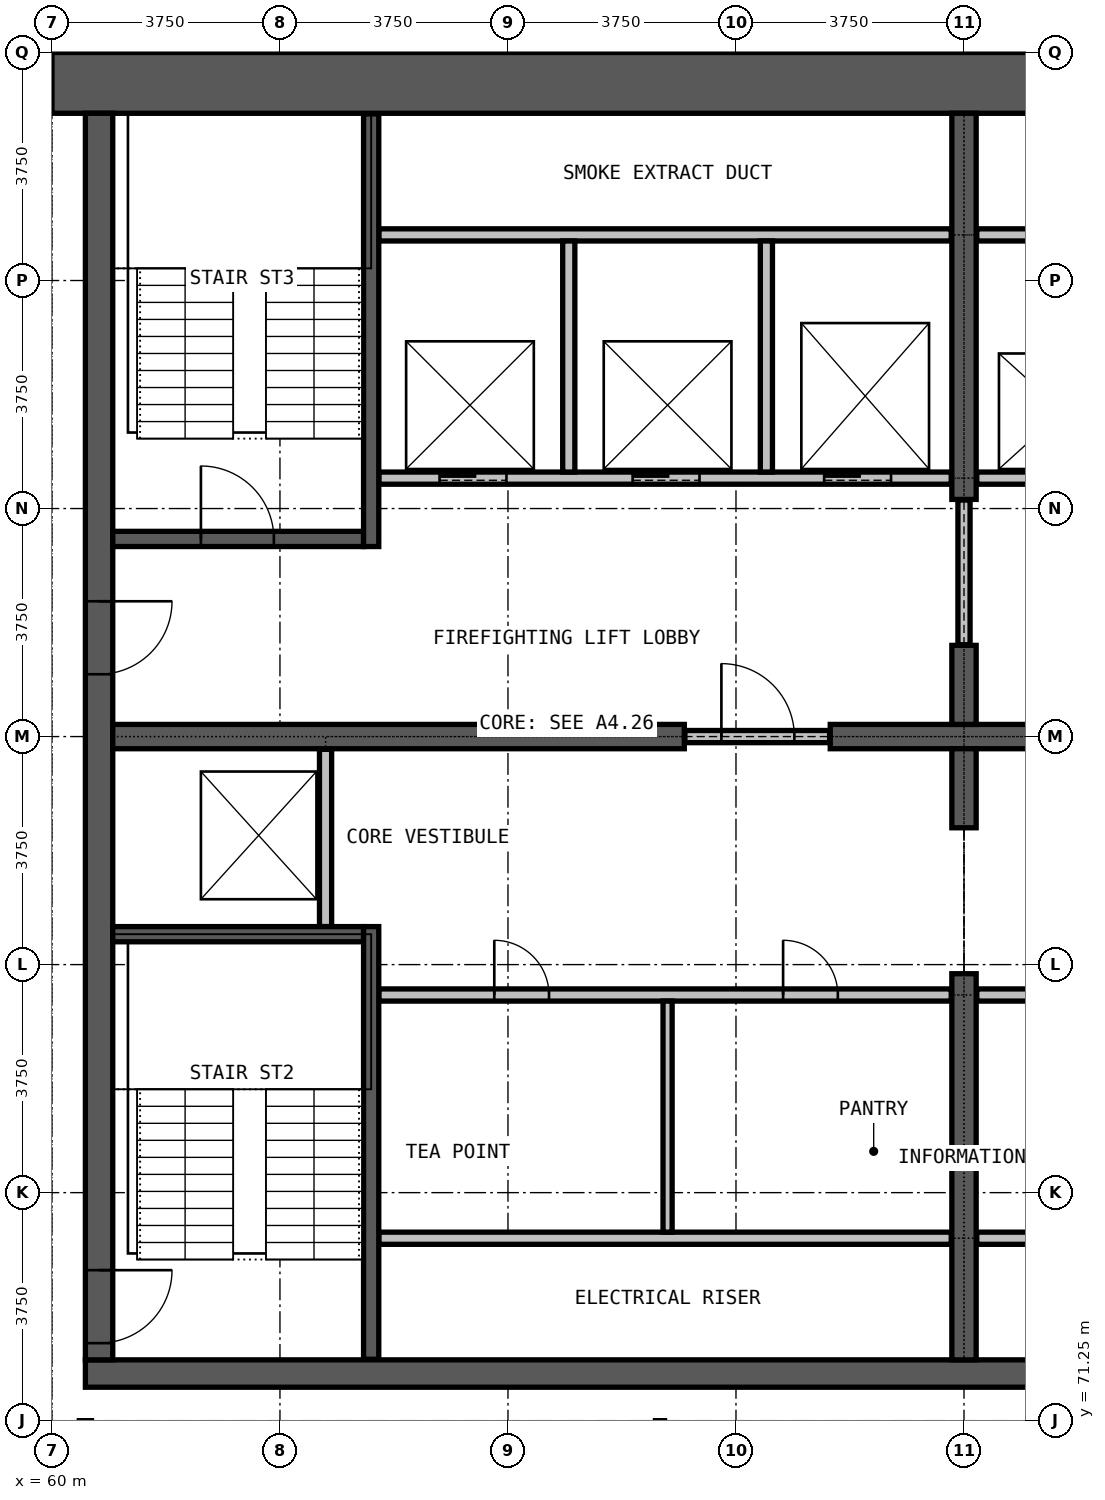
"""IFC4 building model, lengths in metres.
Left out: names, types, materials, properties, quantities, classifications, styles, units other than length and angle.
Written with IfcOpenShell. Run it as: python <this file> out.ifc"""

import sys

from ifc_helpers import new_model, si_unit, direction, frame, frame_2d, origin, place, context, subcontext, project, spatial, rectangle, extrude, element, fill, save


model = new_model("IFC4")
c1 = context("Model", 3, precision=1e-05, world=origin(), true_north=direction((0.0, 1.0)))
c2 = subcontext(c1, "Body", "Model", "MODEL_VIEW")
j1 = project(units=[si_unit("LENGTHUNIT", "METRE"), si_unit("PLANEANGLEUNIT", "RADIAN")], contexts=[c1])
p1 = place(None, origin())
s1 = spatial("IfcSite", under=j1, at=p1, CompositionType="ELEMENT")
p2 = place(p1, origin())
s2 = spatial("IfcBuilding", under=s1, at=p2, CompositionType="ELEMENT")
p3 = place(p2, frame((0.0, 0.0, 262.1)))
s3 = spatial("IfcBuildingStorey", under=s2, at=p3, CompositionType="ELEMENT", Elevation=262.1)
p4 = place(p3, frame((60.55, 72.025, 0.0), z_axis=(0.0, 0.0, 1.0), x_axis=(1.0, 0.0, 0.0)))
e1 = element("IfcWall", 1, at=p4, inside=s3, PredefinedType="SHEAR", context=c2, shape_type="SweptSolid", body=[
    extrude(rectangle(XDim=28.9, YDim=0.45, at=frame_2d((14.45, 0.0))), origin(), (0.0, 0.0, 1.0), 3.6),
])
p5 = place(p3, frame((90.0, 93.25, 0.0), z_axis=(0.0, 0.0, 1.0), x_axis=(-1.0, 0.0, 0.0)))
e2 = element("IfcWall", 2, at=p5, inside=s3, PredefinedType="SHEAR", context=c2, shape_type="SweptSolid", body=[
    extrude(rectangle(XDim=30.0, YDim=1.0, at=frame_2d((15.0, 0.0))), origin(), (0.0, 0.0, 1.0), 3.6),
])
p6 = place(p3, frame((60.775, 92.75, 0.0), z_axis=(0.0, 0.0, 1.0), x_axis=(0.0, -1.0, 0.0)))
e3 = element("IfcWall", 3, at=p6, inside=s3, PredefinedType="SHEAR", context=c2, shape_type="SweptSolid", body=[
    extrude(rectangle(XDim=20.5, YDim=0.45, at=frame_2d((10.25, 0.0))), origin(), (0.0, 0.0, 1.0), 3.6),
])
p7 = place(p6, frame((19.025, 0.0, 0.0)))
e4 = element("IfcOpeningElement", 4, at=p7, cuts=e3, PredefinedType="OPENING", context=c2, shape_type="SweptSolid", body=[
    extrude(rectangle(XDim=1.2, YDim=2.2, at=frame_2d((0.6, 1.1))), frame((0.0, 0.235, 0.0), z_axis=(0.0, -1.0, 0.0), x_axis=(1.0, 0.0, 0.0)), (0.0, 0.0, 1.0), 0.47),
])
p8 = place(p6, frame((8.025, 0.0, 0.0)))
e5 = element("IfcOpeningElement", 5, at=p8, cuts=e3, PredefinedType="OPENING", context=c2, shape_type="SweptSolid", body=[
    extrude(rectangle(XDim=1.2, YDim=2.2, at=frame_2d((0.6, 1.1))), frame((0.0, 0.235, 0.0), z_axis=(0.0, -1.0, 0.0), x_axis=(1.0, 0.0, 0.0)), (0.0, 0.0, 1.0), 0.47),
])
p9 = place(p3, frame((61.0, 82.5, 0.0), z_axis=(0.0, 0.0, 1.0), x_axis=(1.0, 0.0, 0.0)))
e6 = element("IfcWall", 6, at=p9, inside=s3, PredefinedType="SHEAR", context=c2, shape_type="SweptSolid", body=[
    extrude(rectangle(XDim=9.4, YDim=0.4, at=frame_2d((4.7, 0.0))), origin(), (0.0, 0.0, 1.0), 3.6),
])
p10 = place(p3, frame((72.8, 82.5, 0.0), z_axis=(0.0, 0.0, 1.0), x_axis=(1.0, 0.0, 0.0)))
e7 = element("IfcWall", 7, at=p10, inside=s3, PredefinedType="SHEAR", context=c2, shape_type="SweptSolid", body=[
    extrude(rectangle(XDim=4.4, YDim=0.4, at=frame_2d((2.2, 0.0))), origin(), (0.0, 0.0, 1.0), 3.6),
])
p11 = place(p3, frame((75.0, 72.25, 0.0), z_axis=(0.0, 0.0, 1.0), x_axis=(0.0, 1.0, 0.0)))
e8 = element("IfcWall", 8, at=p11, inside=s3, PredefinedType="SHEAR", context=c2, shape_type="SweptSolid", body=[
    extrude(rectangle(XDim=6.35, YDim=0.4, at=frame_2d((3.175, 0.0))), origin(), (0.0, 0.0, 1.0), 3.6),
])
for number, where, z_axis, x_axis in (
    (9, (75.0, 81.0, 0.0), (0.0, 0.0, 1.0), (0.0, 1.0, 0.0)),
    (10, (75.0, 82.7, 0.0), (0.0, 0.0, 1.0), (0.0, 1.0, 0.0)),
):
    element("IfcWall", number, at=place(p3, frame(where, z_axis=z_axis, x_axis=x_axis)), inside=s3, PredefinedType="SHEAR", context=c2, shape_type="SweptSolid", body=[
        extrude(rectangle(XDim=1.3, YDim=0.4, at=frame_2d((0.65, 0.0))), origin(), (0.0, 0.0, 1.0), 3.6),
    ])
p12 = place(p3, frame((75.0, 86.4, 0.0), z_axis=(0.0, 0.0, 1.0), x_axis=(0.0, 1.0, 0.0)))
e11 = element("IfcWall", 11, at=p12, inside=s3, PredefinedType="SHEAR", context=c2, shape_type="SweptSolid", body=[
    extrude(rectangle(XDim=6.35, YDim=0.4, at=frame_2d((3.175, 0.0))), origin(), (0.0, 0.0, 1.0), 3.6),
])
for number, where, z_axis, x_axis in (
    (12, (65.375, 74.25, 0.0), (0.0, 0.0, 1.0), (1.0, 0.0, 0.0)),
    (13, (75.21, 74.25, 0.0), (0.0, 0.0, 1.0), (1.0, 0.0, 0.0)),
):
    element("IfcWall", number, at=place(p3, frame(where, z_axis=z_axis, x_axis=x_axis)), inside=s3, PredefinedType="PARTITIONING", context=c2, shape_type="SweptSolid", body=[
        extrude(rectangle(XDim=9.415, YDim=0.2, at=frame_2d((4.708, 0.0))), origin(), (0.0, 0.0, 1.0), 3.3),
    ])
p13 = place(p3, frame((65.375, 78.25, 0.0), z_axis=(0.0, 0.0, 1.0), x_axis=(1.0, 0.0, 0.0)))
e14 = element("IfcWall", 14, at=p13, inside=s3, PredefinedType="PARTITIONING", context=c2, shape_type="SweptSolid", body=[
    extrude(rectangle(XDim=9.415, YDim=0.2, at=frame_2d((4.708, 0.0))), origin(), (0.0, 0.0, 1.0), 3.3),
])
p14 = place(p13, frame((1.9, 0.0, 0.0)))
e15 = element("IfcOpeningElement", 15, at=p14, cuts=e14, PredefinedType="OPENING", context=c2, shape_type="SweptSolid", body=[
    extrude(rectangle(XDim=0.9, YDim=2.2, at=frame_2d((0.45, 1.1))), frame((0.0, 0.11, 0.0), z_axis=(0.0, -1.0, 0.0), x_axis=(1.0, 0.0, 0.0)), (0.0, 0.0, 1.0), 0.22),
])
p15 = place(p13, frame((6.65, 0.0, 0.0)))
e16 = element("IfcOpeningElement", 16, at=p15, cuts=e14, PredefinedType="OPENING", context=c2, shape_type="SweptSolid", body=[
    extrude(rectangle(XDim=0.9, YDim=2.2, at=frame_2d((0.45, 1.1))), frame((0.0, 0.11, 0.0), z_axis=(0.0, -1.0, 0.0), x_axis=(1.0, 0.0, 0.0)), (0.0, 0.0, 1.0), 0.22),
])
p16 = place(p3, frame((75.21, 78.25, 0.0), z_axis=(0.0, 0.0, 1.0), x_axis=(1.0, 0.0, 0.0)))
e17 = element("IfcWall", 17, at=p16, inside=s3, PredefinedType="PARTITIONING", context=c2, shape_type="SweptSolid", body=[
    extrude(rectangle(XDim=9.415, YDim=0.2, at=frame_2d((4.708, 0.0))), origin(), (0.0, 0.0, 1.0), 3.3),
])
p17 = place(p16, frame((0.95, 0.0, 0.0)))
e18 = element("IfcOpeningElement", 18, at=p17, cuts=e17, PredefinedType="OPENING", context=c2, shape_type="SweptSolid", body=[
    extrude(rectangle(XDim=0.9, YDim=2.2, at=frame_2d((0.45, 1.1))), frame((0.0, 0.11, 0.0), z_axis=(0.0, -1.0, 0.0), x_axis=(1.0, 0.0, 0.0)), (0.0, 0.0, 1.0), 0.22),
])
p18 = place(p16, frame((5.63, 0.0, 0.0)))
e19 = element("IfcOpeningElement", 19, at=p18, cuts=e17, PredefinedType="OPENING", context=c2, shape_type="SweptSolid", body=[
    extrude(rectangle(XDim=0.9, YDim=2.2, at=frame_2d((0.45, 1.1))), frame((0.0, 0.11, 0.0), z_axis=(0.0, -1.0, 0.0), x_axis=(1.0, 0.0, 0.0)), (0.0, 0.0, 1.0), 0.22),
])
p19 = place(p3, frame((70.41, 82.5, 0.0), z_axis=(0.0, 0.0, 1.0), x_axis=(1.0, 0.0, 0.0)))
e20 = element("IfcWall", 20, at=p19, inside=s3, PredefinedType="PARTITIONING", context=c2, shape_type="SweptSolid", body=[
    extrude(rectangle(XDim=2.38, YDim=0.2, at=frame_2d((1.19, 0.0))), origin(), (0.0, 0.0, 1.0), 2.4),
])
p20 = place(p19, frame((0.6, 0.0, 0.0)))
e21 = element("IfcOpeningElement", 21, at=p20, cuts=e20, PredefinedType="OPENING", context=c2, shape_type="SweptSolid", body=[
    extrude(rectangle(XDim=1.2, YDim=2.2, at=frame_2d((0.6, 1.1))), frame((0.0, 0.11, 0.0), z_axis=(0.0, -1.0, 0.0), x_axis=(1.0, 0.0, 0.0)), (0.0, 0.0, 1.0), 0.22),
])
p21 = place(p3, frame((75.0, 84.01, 0.0), z_axis=(0.0, 0.0, 1.0), x_axis=(0.0, 1.0, 0.0)))
e22 = element("IfcWall", 22, at=p21, inside=s3, PredefinedType="PARTITIONING", context=c2, shape_type="SweptSolid", body=[
    extrude(rectangle(XDim=2.38, YDim=0.2, at=frame_2d((1.19, 0.0))), origin(), (0.0, 0.0, 1.0), 2.4),
])
p22 = place(p3, frame((70.125, 74.35, 0.0), z_axis=(0.0, 0.0, 1.0), x_axis=(0.0, 1.0, 0.0)))
e23 = element("IfcWall", 23, at=p22, inside=s3, PredefinedType="PARTITIONING", context=c2, shape_type="SweptSolid", body=[
    extrude(rectangle(XDim=3.8, YDim=0.15, at=frame_2d((1.9, 0.0))), origin(), (0.0, 0.0, 1.0), 3.3),
])
p23 = place(p3, frame((65.375, 86.75, 0.0), z_axis=(0.0, 0.0, 1.0), x_axis=(1.0, 0.0, 0.0)))
e24 = element("IfcWall", 24, at=p23, inside=s3, PredefinedType="PARTITIONING", context=c2, shape_type="SweptSolid", body=[
    extrude(rectangle(XDim=9.415, YDim=0.2, at=frame_2d((4.708, 0.0))), origin(), (0.0, 0.0, 1.0), 3.3),
])
p24 = place(p23, frame((1.0, 0.0, 0.0)))
e25 = element("IfcOpeningElement", 25, at=p24, cuts=e24, PredefinedType="OPENING", context=c2, shape_type="SweptSolid", body=[
    extrude(rectangle(XDim=1.1, YDim=2.2, at=frame_2d((0.55, 1.1))), frame((0.0, 0.11, 0.0), z_axis=(0.0, -1.0, 0.0), x_axis=(1.0, 0.0, 0.0)), (0.0, 0.0, 1.0), 0.22),
])
p25 = place(p23, frame((4.175, 0.0, 0.0)))
e26 = element("IfcOpeningElement", 26, at=p25, cuts=e24, PredefinedType="OPENING", context=c2, shape_type="SweptSolid", body=[
    extrude(rectangle(XDim=1.1, YDim=2.2, at=frame_2d((0.55, 1.1))), frame((0.0, 0.11, 0.0), z_axis=(0.0, -1.0, 0.0), x_axis=(1.0, 0.0, 0.0)), (0.0, 0.0, 1.0), 0.22),
])
p26 = place(p23, frame((7.325, 0.0, 0.0)))
e27 = element("IfcOpeningElement", 27, at=p26, cuts=e24, PredefinedType="OPENING", context=c2, shape_type="SweptSolid", body=[
    extrude(rectangle(XDim=1.1, YDim=2.2, at=frame_2d((0.55, 1.1))), frame((0.0, 0.11, 0.0), z_axis=(0.0, -1.0, 0.0), x_axis=(1.0, 0.0, 0.0)), (0.0, 0.0, 1.0), 0.22),
])
p27 = place(p3, frame((75.21, 86.75, 0.0), z_axis=(0.0, 0.0, 1.0), x_axis=(1.0, 0.0, 0.0)))
e28 = element("IfcWall", 28, at=p27, inside=s3, PredefinedType="PARTITIONING", context=c2, shape_type="SweptSolid", body=[
    extrude(rectangle(XDim=9.415, YDim=0.2, at=frame_2d((4.708, 0.0))), origin(), (0.0, 0.0, 1.0), 3.3),
])
p28 = place(p27, frame((0.95, 0.0, 0.0)))
e29 = element("IfcOpeningElement", 29, at=p28, cuts=e28, PredefinedType="OPENING", context=c2, shape_type="SweptSolid", body=[
    extrude(rectangle(XDim=1.1, YDim=2.2, at=frame_2d((0.55, 1.1))), frame((0.0, 0.11, 0.0), z_axis=(0.0, -1.0, 0.0), x_axis=(1.0, 0.0, 0.0)), (0.0, 0.0, 1.0), 0.22),
])
p29 = place(p27, frame((4.14, 0.0, 0.0)))
e30 = element("IfcOpeningElement", 30, at=p29, cuts=e28, PredefinedType="OPENING", context=c2, shape_type="SweptSolid", body=[
    extrude(rectangle(XDim=1.1, YDim=2.2, at=frame_2d((0.55, 1.1))), frame((0.0, 0.11, 0.0), z_axis=(0.0, -1.0, 0.0), x_axis=(1.0, 0.0, 0.0)), (0.0, 0.0, 1.0), 0.22),
])
p30 = place(p27, frame((7.29, 0.0, 0.0)))
e31 = element("IfcOpeningElement", 31, at=p30, cuts=e28, PredefinedType="OPENING", context=c2, shape_type="SweptSolid", body=[
    extrude(rectangle(XDim=1.1, YDim=2.2, at=frame_2d((0.55, 1.1))), frame((0.0, 0.11, 0.0), z_axis=(0.0, -1.0, 0.0), x_axis=(1.0, 0.0, 0.0)), (0.0, 0.0, 1.0), 0.22),
])
for number, where, z_axis, x_axis in (
    (32, (65.375, 90.75, 0.0), (0.0, 0.0, 1.0), (1.0, 0.0, 0.0)),
    (33, (75.21, 90.75, 0.0), (0.0, 0.0, 1.0), (1.0, 0.0, 0.0)),
):
    element("IfcWall", number, at=place(p3, frame(where, z_axis=z_axis, x_axis=x_axis)), inside=s3, PredefinedType="PARTITIONING", context=c2, shape_type="SweptSolid", body=[
        extrude(rectangle(XDim=9.415, YDim=0.2, at=frame_2d((4.708, 0.0))), origin(), (0.0, 0.0, 1.0), 3.3),
    ])
p31 = place(p3, frame((64.5, 79.375, 0.0), z_axis=(0.0, 0.0, 1.0), x_axis=(0.0, 1.0, 0.0)))
e34 = element("IfcWall", 34, at=p31, inside=s3, PredefinedType="PARTITIONING", context=c2, shape_type="SweptSolid", body=[
    extrude(rectangle(XDim=2.915, YDim=0.2, at=frame_2d((1.458, 0.0))), origin(), (0.0, 0.0, 1.0), 3.3),
])
for number, where, z_axis, x_axis in (
    (35, (68.5, 86.85, 0.0), (0.0, 0.0, 1.0), (0.0, 1.0, 0.0)),
    (36, (71.75, 86.85, 0.0), (0.0, 0.0, 1.0), (0.0, 1.0, 0.0)),
):
    element("IfcWall", number, at=place(p3, frame(where, z_axis=z_axis, x_axis=x_axis)), inside=s3, PredefinedType="PARTITIONING", context=c2, shape_type="SweptSolid", body=[
        extrude(rectangle(XDim=3.8, YDim=0.2, at=frame_2d((1.9, 0.0))), origin(), (0.0, 0.0, 1.0), 3.3),
    ])
p32 = place(p3, frame((61.0, 79.25, 0.0), z_axis=(0.0, 0.0, 1.0), x_axis=(1.0, 0.0, 0.0)))
e37 = element("IfcWall", 37, at=p32, inside=s3, PredefinedType="PARTITIONING", context=c2, shape_type="SweptSolid", body=[
    extrude(rectangle(XDim=4.125, YDim=0.25, at=frame_2d((2.062, 0.0))), origin(), (0.0, 0.0, 1.0), 3.3),
])
p33 = place(p3, frame((61.0, 85.75, 0.0), z_axis=(0.0, 0.0, 1.0), x_axis=(1.0, 0.0, 0.0)))
e38 = element("IfcWall", 38, at=p33, inside=s3, PredefinedType="PARTITIONING", context=c2, shape_type="SweptSolid", body=[
    extrude(rectangle(XDim=4.125, YDim=0.25, at=frame_2d((2.062, 0.0))), origin(), (0.0, 0.0, 1.0), 3.3),
])
p34 = place(p33, frame((1.45, 0.0, 0.0)))
e39 = element("IfcOpeningElement", 39, at=p34, cuts=e38, PredefinedType="OPENING", context=c2, shape_type="SweptSolid", body=[
    extrude(rectangle(XDim=1.2, YDim=2.2, at=frame_2d((0.6, 1.1))), frame((0.0, 0.135, 0.0), z_axis=(0.0, -1.0, 0.0), x_axis=(1.0, 0.0, 0.0)), (0.0, 0.0, 1.0), 0.27),
])
for number, where, z_axis, x_axis in (
    (40, (65.25, 72.26, 0.0), (0.0, 0.0, 1.0), (0.0, 1.0, 0.0)),
    (41, (65.25, 85.625, 0.0), (0.0, 0.0, 1.0), (0.0, 1.0, 0.0)),
):
    element("IfcWall", number, at=place(p3, frame(where, z_axis=z_axis, x_axis=x_axis)), inside=s3, PredefinedType="PARTITIONING", context=c2, shape_type="SweptSolid", body=[
        extrude(rectangle(XDim=7.115, YDim=0.25, at=frame_2d((3.558, 0.0))), origin(), (0.0, 0.0, 1.0), 3.3),
    ])
p35 = place(p24, origin())
e42 = element("IfcDoor", 42, at=p35, inside=s3, OperationType="DOUBLE_DOOR_SLIDING", PredefinedType="DOOR", context=c2, shape_type="SweptSolid", body=[
    extrude(rectangle(XDim=1.1, YDim=2.2, at=frame_2d((0.55, 1.1))), frame((0.0, 0.025, 0.0), z_axis=(0.0, -1.0, 0.0), x_axis=(1.0, 0.0, 0.0)), (0.0, 0.0, 1.0), 0.05),
])
fill(e25, e42)
p36 = place(p25, origin())
e43 = element("IfcDoor", 43, at=p36, inside=s3, OperationType="DOUBLE_DOOR_SLIDING", PredefinedType="DOOR", context=c2, shape_type="SweptSolid", body=[
    extrude(rectangle(XDim=1.1, YDim=2.2, at=frame_2d((0.55, 1.1))), frame((0.0, 0.025, 0.0), z_axis=(0.0, -1.0, 0.0), x_axis=(1.0, 0.0, 0.0)), (0.0, 0.0, 1.0), 0.05),
])
fill(e26, e43)
p37 = place(p26, origin())
e44 = element("IfcDoor", 44, at=p37, inside=s3, OperationType="DOUBLE_DOOR_SLIDING", PredefinedType="DOOR", context=c2, shape_type="SweptSolid", body=[
    extrude(rectangle(XDim=1.1, YDim=2.2, at=frame_2d((0.55, 1.1))), frame((0.0, 0.025, 0.0), z_axis=(0.0, -1.0, 0.0), x_axis=(1.0, 0.0, 0.0)), (0.0, 0.0, 1.0), 0.05),
])
fill(e27, e44)
p38 = place(p20, origin())
e45 = element("IfcDoor", 45, at=p38, inside=s3, OperationType="SINGLE_SWING_LEFT", PredefinedType="DOOR", context=c2, shape_type="SweptSolid", body=[
    extrude(rectangle(XDim=1.2, YDim=2.2, at=frame_2d((0.6, 1.1))), frame((0.0, 0.025, 0.0), z_axis=(0.0, -1.0, 0.0), x_axis=(1.0, 0.0, 0.0)), (0.0, 0.0, 1.0), 0.05),
])
fill(e21, e45)
p39 = place(p34, origin())
e46 = element("IfcDoor", 46, at=p39, inside=s3, OperationType="SINGLE_SWING_LEFT", PredefinedType="DOOR", context=c2, shape_type="SweptSolid", body=[
    extrude(rectangle(XDim=1.2, YDim=2.2, at=frame_2d((0.6, 1.1))), frame((0.0, 0.025, 0.0), z_axis=(0.0, -1.0, 0.0), x_axis=(1.0, 0.0, 0.0)), (0.0, 0.0, 1.0), 0.05),
])
fill(e39, e46)
p40 = place(p7, origin())
e47 = element("IfcDoor", 47, at=p40, inside=s3, OperationType="SINGLE_SWING_LEFT", PredefinedType="DOOR", context=c2, shape_type="SweptSolid", body=[
    extrude(rectangle(XDim=1.2, YDim=2.2, at=frame_2d((0.6, 1.1))), frame((0.0, 0.025, 0.0), z_axis=(0.0, -1.0, 0.0), x_axis=(1.0, 0.0, 0.0)), (0.0, 0.0, 1.0), 0.05),
])
fill(e4, e47)
p41 = place(p8, origin())
e48 = element("IfcDoor", 48, at=p41, inside=s3, OperationType="SINGLE_SWING_LEFT", PredefinedType="DOOR", context=c2, shape_type="SweptSolid", body=[
    extrude(rectangle(XDim=1.2, YDim=2.2, at=frame_2d((0.6, 1.1))), frame((0.0, 0.025, 0.0), z_axis=(0.0, -1.0, 0.0), x_axis=(1.0, 0.0, 0.0)), (0.0, 0.0, 1.0), 0.05),
])
fill(e5, e48)
p42 = place(p14, origin())
e49 = element("IfcDoor", 49, at=p42, inside=s3, OperationType="SINGLE_SWING_RIGHT", PredefinedType="DOOR", context=c2, shape_type="SweptSolid", body=[
    extrude(rectangle(XDim=0.9, YDim=2.2, at=frame_2d((0.45, 1.1))), frame((0.0, 0.025, 0.0), z_axis=(0.0, -1.0, 0.0), x_axis=(1.0, 0.0, 0.0)), (0.0, 0.0, 1.0), 0.05),
])
fill(e15, e49)
p43 = place(p15, origin())
e50 = element("IfcDoor", 50, at=p43, inside=s3, OperationType="SINGLE_SWING_LEFT", PredefinedType="DOOR", context=c2, shape_type="SweptSolid", body=[
    extrude(rectangle(XDim=0.9, YDim=2.2, at=frame_2d((0.45, 1.1))), frame((0.0, 0.025, 0.0), z_axis=(0.0, -1.0, 0.0), x_axis=(1.0, 0.0, 0.0)), (0.0, 0.0, 1.0), 0.05),
])
fill(e16, e50)
save(model, sys.argv[1])
